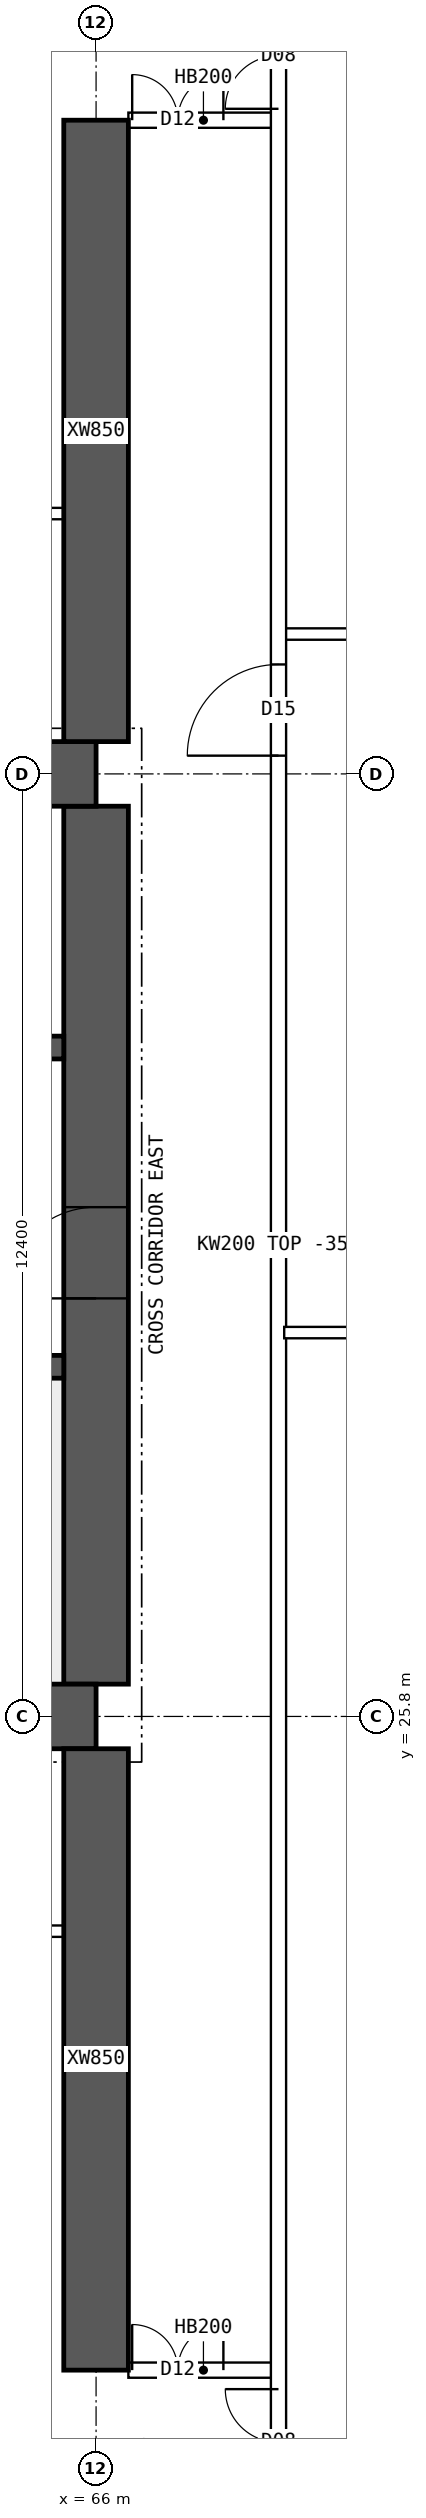
"""IFC4 building model, lengths in metres.
Left out: names, types, materials, properties, quantities, classifications, styles, units other than length and angle.
Written with IfcOpenShell. Run it as: python <this file> out.ifc"""

import sys

from ifc_helpers import new_model, si_unit, direction, frame, frame_2d, origin, place, context, subcontext, project, spatial, polyline, rectangle, outline, extrude, element, fill, save


model = new_model("IFC4")
c1 = context("Model", 3, precision=1e-05, world=origin(), true_north=direction((0.0, 1.0)))
c2 = subcontext(c1, "Body", "Model", "MODEL_VIEW")
j1 = project(units=[si_unit("LENGTHUNIT", "METRE"), si_unit("PLANEANGLEUNIT", "RADIAN")], contexts=[c1])
p1 = place(None, origin())
s1 = spatial("IfcSite", under=j1, at=p1, CompositionType="ELEMENT")
p2 = place(p1, origin())
s2 = spatial("IfcBuilding", under=s1, at=p2, CompositionType="ELEMENT")
p3 = place(p2, frame((0.0, 0.0, 197.35)))
s3 = spatial("IfcBuildingStorey", under=s2, at=p3, CompositionType="ELEMENT", Elevation=197.35)
for number, where, z_axis, x_axis in (
    (1, (18.0, 25.8, 0.0), (0.0, 0.0, 1.0), (1.0, 0.0, 0.0)),
    (2, (18.0, 38.2, 0.0), (0.0, 0.0, 1.0), (1.0, 0.0, 0.0)),
):
    element("IfcWall", number, at=place(p3, frame(where, z_axis=z_axis, x_axis=x_axis)), inside=s3, PredefinedType="SHEAR", context=c2, shape_type="SweptSolid", body=[
        extrude(rectangle(XDim=48.0, YDim=0.85, at=frame_2d((24.0, 0.0))), origin(), (0.0, 0.0, 1.0), 3.75),
    ])
p4 = place(p3, frame((66.0, 26.225, 0.0), z_axis=(0.0, 0.0, 1.0), x_axis=(0.0, 1.0, 0.0)))
e3 = element("IfcWall", 3, at=p4, inside=s3, PredefinedType="SHEAR", context=c2, shape_type="SweptSolid", body=[
    extrude(rectangle(XDim=11.55, YDim=0.85, at=frame_2d((5.775, 0.0))), origin(), (0.0, 0.0, 1.0), 3.75),
])
p5 = place(p4, frame((5.075, 0.0, 0.0)))
e4 = element("IfcOpeningElement", 4, at=p5, cuts=e3, PredefinedType="OPENING", context=c2, shape_type="SweptSolid", body=[
    extrude(rectangle(XDim=1.2, YDim=2.1, at=frame_2d((0.6, 1.05))), frame((0.0, 0.435, 0.0), z_axis=(0.0, -1.0, 0.0), x_axis=(1.0, 0.0, 0.0)), (0.0, 0.0, 1.0), 0.87),
])
p6 = place(p3, frame((18.425, 30.4, 0.0), z_axis=(0.0, 0.0, 1.0), x_axis=(1.0, 0.0, 0.0)))
e5 = element("IfcWall", 5, at=p6, inside=s3, PredefinedType="SHEAR", context=c2, shape_type="SweptSolid", body=[
    extrude(rectangle(XDim=47.15, YDim=0.3, at=frame_2d((23.575, 0.0))), origin(), (0.0, 0.0, 1.0), 3.75),
])
p7 = place(p6, frame((0.4, 0.0, 0.0)))
e6 = element("IfcOpeningElement", 6, at=p7, cuts=e5, PredefinedType="OPENING", context=c2, shape_type="SweptSolid", body=[
    extrude(rectangle(XDim=1.0, YDim=2.1, at=frame_2d((0.5, 1.05))), frame((0.0, 0.16, 0.0), z_axis=(0.0, -1.0, 0.0), x_axis=(1.0, 0.0, 0.0)), (0.0, 0.0, 1.0), 0.32),
])
p8 = place(p6, frame((45.75, 0.0, 0.0)))
e7 = element("IfcOpeningElement", 7, at=p8, cuts=e5, PredefinedType="OPENING", context=c2, shape_type="SweptSolid", body=[
    extrude(rectangle(XDim=1.0, YDim=2.1, at=frame_2d((0.5, 1.05))), frame((0.0, 0.16, 0.0), z_axis=(0.0, -1.0, 0.0), x_axis=(1.0, 0.0, 0.0)), (0.0, 0.0, 1.0), 0.32),
])
p9 = place(p6, frame((8.325, 0.0, 0.0)))
e8 = element("IfcOpeningElement", 8, at=p9, cuts=e5, PredefinedType="OPENING", context=c2, shape_type="SweptSolid", body=[
    extrude(rectangle(XDim=1.1, YDim=2.1, at=frame_2d((0.55, 1.05))), frame((0.0, 0.16, 0.0), z_axis=(0.0, -1.0, 0.0), x_axis=(1.0, 0.0, 0.0)), (0.0, 0.0, 1.0), 0.32),
])
p10 = place(p6, frame((10.925, 0.0, 0.0)))
e9 = element("IfcOpeningElement", 9, at=p10, cuts=e5, PredefinedType="OPENING", context=c2, shape_type="SweptSolid", body=[
    extrude(rectangle(XDim=1.1, YDim=2.1, at=frame_2d((0.55, 1.05))), frame((0.0, 0.16, 0.0), z_axis=(0.0, -1.0, 0.0), x_axis=(1.0, 0.0, 0.0)), (0.0, 0.0, 1.0), 0.32),
])
p11 = place(p6, frame((13.525, 0.0, 0.0)))
e10 = element("IfcOpeningElement", 10, at=p11, cuts=e5, PredefinedType="OPENING", context=c2, shape_type="SweptSolid", body=[
    extrude(rectangle(XDim=1.1, YDim=2.1, at=frame_2d((0.55, 1.05))), frame((0.0, 0.16, 0.0), z_axis=(0.0, -1.0, 0.0), x_axis=(1.0, 0.0, 0.0)), (0.0, 0.0, 1.0), 0.32),
])
p12 = place(p6, frame((16.125, 0.0, 0.0)))
e11 = element("IfcOpeningElement", 11, at=p12, cuts=e5, PredefinedType="OPENING", context=c2, shape_type="SweptSolid", body=[
    extrude(rectangle(XDim=1.1, YDim=2.1, at=frame_2d((0.55, 1.05))), frame((0.0, 0.16, 0.0), z_axis=(0.0, -1.0, 0.0), x_axis=(1.0, 0.0, 0.0)), (0.0, 0.0, 1.0), 0.32),
])
p13 = place(p6, frame((18.9, 0.0, 0.0)))
e12 = element("IfcOpeningElement", 12, at=p13, cuts=e5, PredefinedType="OPENING", context=c2, shape_type="SweptSolid", body=[
    extrude(rectangle(XDim=0.9, YDim=2.1, at=frame_2d((0.45, 1.05))), frame((0.0, 0.16, 0.0), z_axis=(0.0, -1.0, 0.0), x_axis=(1.0, 0.0, 0.0)), (0.0, 0.0, 1.0), 0.32),
])
p14 = place(p6, frame((30.192, 0.0, 0.0)))
e13 = element("IfcOpeningElement", 13, at=p14, cuts=e5, PredefinedType="OPENING", context=c2, shape_type="SweptSolid", body=[
    extrude(rectangle(XDim=1.1, YDim=2.1, at=frame_2d((0.55, 1.05))), frame((0.0, 0.16, 0.0), z_axis=(0.0, -1.0, 0.0), x_axis=(1.0, 0.0, 0.0)), (0.0, 0.0, 1.0), 0.32),
])
p15 = place(p6, frame((33.725, 0.0, 0.0)))
e14 = element("IfcOpeningElement", 14, at=p15, cuts=e5, PredefinedType="OPENING", context=c2, shape_type="SweptSolid", body=[
    extrude(rectangle(XDim=1.1, YDim=2.1, at=frame_2d((0.55, 1.05))), frame((0.0, 0.16, 0.0), z_axis=(0.0, -1.0, 0.0), x_axis=(1.0, 0.0, 0.0)), (0.0, 0.0, 1.0), 0.32),
])
p16 = place(p6, frame((37.258, 0.0, 0.0)))
e15 = element("IfcOpeningElement", 15, at=p16, cuts=e5, PredefinedType="OPENING", context=c2, shape_type="SweptSolid", body=[
    extrude(rectangle(XDim=1.1, YDim=2.1, at=frame_2d((0.55, 1.05))), frame((0.0, 0.16, 0.0), z_axis=(0.0, -1.0, 0.0), x_axis=(1.0, 0.0, 0.0)), (0.0, 0.0, 1.0), 0.32),
])
p17 = place(p3, frame((18.425, 34.6, 0.0), z_axis=(0.0, 0.0, 1.0), x_axis=(1.0, 0.0, 0.0)))
e16 = element("IfcWall", 16, at=p17, inside=s3, PredefinedType="SHEAR", context=c2, shape_type="SweptSolid", body=[
    extrude(rectangle(XDim=47.15, YDim=0.3, at=frame_2d((23.575, 0.0))), origin(), (0.0, 0.0, 1.0), 3.75),
])
p18 = place(p17, frame((0.9, 0.0, 0.0)))
e17 = element("IfcOpeningElement", 17, at=p18, cuts=e16, PredefinedType="OPENING", context=c2, shape_type="SweptSolid", body=[
    extrude(rectangle(XDim=1.1, YDim=2.1, at=frame_2d((0.55, 1.05))), frame((0.0, 0.16, 0.0), z_axis=(0.0, -1.0, 0.0), x_axis=(1.0, 0.0, 0.0)), (0.0, 0.0, 1.0), 0.32),
])
p19 = place(p17, frame((45.15, 0.0, 0.0)))
e18 = element("IfcOpeningElement", 18, at=p19, cuts=e16, PredefinedType="OPENING", context=c2, shape_type="SweptSolid", body=[
    extrude(rectangle(XDim=1.1, YDim=2.1, at=frame_2d((0.55, 1.05))), frame((0.0, 0.16, 0.0), z_axis=(0.0, -1.0, 0.0), x_axis=(1.0, 0.0, 0.0)), (0.0, 0.0, 1.0), 0.32),
])
p20 = place(p17, frame((4.175, 0.0, 0.0)))
e19 = element("IfcOpeningElement", 19, at=p20, cuts=e16, PredefinedType="OPENING", context=c2, shape_type="SweptSolid", body=[
    extrude(rectangle(XDim=0.9, YDim=2.1, at=frame_2d((0.45, 1.05))), frame((0.0, 0.16, 0.0), z_axis=(0.0, -1.0, 0.0), x_axis=(1.0, 0.0, 0.0)), (0.0, 0.0, 1.0), 0.32),
])
p21 = place(p17, frame((42.075, 0.0, 0.0)))
e20 = element("IfcOpeningElement", 20, at=p21, cuts=e16, PredefinedType="OPENING", context=c2, shape_type="SweptSolid", body=[
    extrude(rectangle(XDim=0.9, YDim=2.1, at=frame_2d((0.45, 1.05))), frame((0.0, 0.16, 0.0), z_axis=(0.0, -1.0, 0.0), x_axis=(1.0, 0.0, 0.0)), (0.0, 0.0, 1.0), 0.32),
])
p22 = place(p17, frame((8.95, 0.0, 0.0)))
e21 = element("IfcOpeningElement", 21, at=p22, cuts=e16, PredefinedType="OPENING", context=c2, shape_type="SweptSolid", body=[
    extrude(rectangle(XDim=0.9, YDim=2.1, at=frame_2d((0.45, 1.05))), frame((0.0, 0.16, 0.0), z_axis=(0.0, -1.0, 0.0), x_axis=(1.0, 0.0, 0.0)), (0.0, 0.0, 1.0), 0.32),
])
p23 = place(p17, frame((12.924, 0.0, 0.0)))
e22 = element("IfcOpeningElement", 22, at=p23, cuts=e16, PredefinedType="OPENING", context=c2, shape_type="SweptSolid", body=[
    extrude(rectangle(XDim=0.9, YDim=2.1, at=frame_2d((0.45, 1.05))), frame((0.0, 0.16, 0.0), z_axis=(0.0, -1.0, 0.0), x_axis=(1.0, 0.0, 0.0)), (0.0, 0.0, 1.0), 0.32),
])
p24 = place(p17, frame((16.571, 0.0, 0.0)))
e23 = element("IfcOpeningElement", 23, at=p24, cuts=e16, PredefinedType="OPENING", context=c2, shape_type="SweptSolid", body=[
    extrude(rectangle(XDim=0.9, YDim=2.1, at=frame_2d((0.45, 1.05))), frame((0.0, 0.16, 0.0), z_axis=(0.0, -1.0, 0.0), x_axis=(1.0, 0.0, 0.0)), (0.0, 0.0, 1.0), 0.32),
])
p25 = place(p17, frame((20.33, 0.0, 0.0)))
e24 = element("IfcOpeningElement", 24, at=p25, cuts=e16, PredefinedType="OPENING", context=c2, shape_type="SweptSolid", body=[
    extrude(rectangle(XDim=0.9, YDim=2.1, at=frame_2d((0.45, 1.05))), frame((0.0, 0.16, 0.0), z_axis=(0.0, -1.0, 0.0), x_axis=(1.0, 0.0, 0.0)), (0.0, 0.0, 1.0), 0.32),
])
p26 = place(p17, frame((24.736, 0.0, 0.0)))
e25 = element("IfcOpeningElement", 25, at=p26, cuts=e16, PredefinedType="OPENING", context=c2, shape_type="SweptSolid", body=[
    extrude(rectangle(XDim=0.9, YDim=2.1, at=frame_2d((0.45, 1.05))), frame((0.0, 0.16, 0.0), z_axis=(0.0, -1.0, 0.0), x_axis=(1.0, 0.0, 0.0)), (0.0, 0.0, 1.0), 0.32),
])
p27 = place(p17, frame((27.533, 0.0, 0.0)))
e26 = element("IfcOpeningElement", 26, at=p27, cuts=e16, PredefinedType="OPENING", context=c2, shape_type="SweptSolid", body=[
    extrude(rectangle(XDim=0.9, YDim=2.1, at=frame_2d((0.45, 1.05))), frame((0.0, 0.16, 0.0), z_axis=(0.0, -1.0, 0.0), x_axis=(1.0, 0.0, 0.0)), (0.0, 0.0, 1.0), 0.32),
])
p28 = place(p17, frame((29.703, 0.0, 0.0)))
e27 = element("IfcOpeningElement", 27, at=p28, cuts=e16, PredefinedType="OPENING", context=c2, shape_type="SweptSolid", body=[
    extrude(rectangle(XDim=0.9, YDim=2.1, at=frame_2d((0.45, 1.05))), frame((0.0, 0.16, 0.0), z_axis=(0.0, -1.0, 0.0), x_axis=(1.0, 0.0, 0.0)), (0.0, 0.0, 1.0), 0.32),
])
p29 = place(p17, frame((33.502, 0.0, 0.0)))
e28 = element("IfcOpeningElement", 28, at=p29, cuts=e16, PredefinedType="OPENING", context=c2, shape_type="SweptSolid", body=[
    extrude(rectangle(XDim=0.9, YDim=2.1, at=frame_2d((0.45, 1.05))), frame((0.0, 0.16, 0.0), z_axis=(0.0, -1.0, 0.0), x_axis=(1.0, 0.0, 0.0)), (0.0, 0.0, 1.0), 0.32),
])
p30 = place(p17, frame((37.453, 0.0, 0.0)))
e29 = element("IfcOpeningElement", 29, at=p30, cuts=e16, PredefinedType="OPENING", context=c2, shape_type="SweptSolid", body=[
    extrude(rectangle(XDim=0.9, YDim=2.1, at=frame_2d((0.45, 1.05))), frame((0.0, 0.16, 0.0), z_axis=(0.0, -1.0, 0.0), x_axis=(1.0, 0.0, 0.0)), (0.0, 0.0, 1.0), 0.32),
])
for number, where, z_axis, x_axis in (
    (30, (66.0, 17.2, 0.0), (0.0, 0.0, 1.0), (0.0, 1.0, 0.0)),
    (31, (66.0, 38.625, 0.0), (0.0, 0.0, 1.0), (0.0, 1.0, 0.0)),
):
    element("IfcWall", number, at=place(p3, frame(where, z_axis=z_axis, x_axis=x_axis)), inside=s3, PredefinedType="SHEAR", context=c2, shape_type="SweptSolid", body=[
        extrude(rectangle(XDim=8.175, YDim=0.85, at=frame_2d((4.087, 0.0))), origin(), (0.0, 0.0, 1.0), 3.75),
    ])
p31 = place(p3, frame((66.425, 17.2, 0.0), z_axis=(0.0, 0.0, 1.0), x_axis=(1.0, 0.0, 0.0)))
e32 = element("IfcWall", 32, at=p31, inside=s3, PredefinedType="SOLIDWALL", context=c2, shape_type="SweptSolid", body=[
    extrude(rectangle(XDim=1.975, YDim=0.2, at=frame_2d((0.987, 0.0))), origin(), (0.0, 0.0, 1.0), 3.4),
])
p32 = place(p31, frame((0.05, 0.0, 0.0)))
e33 = element("IfcOpeningElement", 33, at=p32, cuts=e32, PredefinedType="OPENING", context=c2, shape_type="SweptSolid", body=[
    extrude(rectangle(XDim=1.2, YDim=2.1, at=frame_2d((0.6, 1.05))), frame((0.0, 0.11, 0.0), z_axis=(0.0, -1.0, 0.0), x_axis=(1.0, 0.0, 0.0)), (0.0, 0.0, 1.0), 0.22),
])
p33 = place(p3, frame((66.425, 46.8, 0.0), z_axis=(0.0, 0.0, 1.0), x_axis=(1.0, 0.0, 0.0)))
e34 = element("IfcWall", 34, at=p33, inside=s3, PredefinedType="SOLIDWALL", context=c2, shape_type="SweptSolid", body=[
    extrude(rectangle(XDim=1.975, YDim=0.2, at=frame_2d((0.987, 0.0))), origin(), (0.0, 0.0, 1.0), 3.4),
])
p34 = place(p33, frame((0.05, 0.0, 0.0)))
e35 = element("IfcOpeningElement", 35, at=p34, cuts=e34, PredefinedType="OPENING", context=c2, shape_type="SweptSolid", body=[
    extrude(rectangle(XDim=1.2, YDim=2.1, at=frame_2d((0.6, 1.05))), frame((0.0, 0.11, 0.0), z_axis=(0.0, -1.0, 0.0), x_axis=(1.0, 0.0, 0.0)), (0.0, 0.0, 1.0), 0.22),
])
p35 = place(p3, frame((60.075, 22.975, 0.0), z_axis=(0.0, 0.0, 1.0), x_axis=(1.0, 0.0, 0.0)))
e36 = element("IfcWall", 36, at=p35, inside=s3, PredefinedType="PARTITIONING", context=c2, shape_type="SweptSolid", body=[
    extrude(rectangle(XDim=5.5, YDim=0.15, at=frame_2d((2.75, 0.0))), origin(), (0.0, 0.0, 1.0), 3.4),
])
p36 = place(p35, frame((0.4, 0.0, 0.0)))
e37 = element("IfcOpeningElement", 37, at=p36, cuts=e36, PredefinedType="OPENING", context=c2, shape_type="SweptSolid", body=[
    extrude(rectangle(XDim=1.0, YDim=2.1, at=frame_2d((0.5, 1.05))), frame((0.0, 0.085, 0.0), z_axis=(0.0, -1.0, 0.0), x_axis=(1.0, 0.0, 0.0)), (0.0, 0.0, 1.0), 0.17),
])
p37 = place(p3, frame((65.575, 41.625, 0.0), z_axis=(0.0, 0.0, 1.0), x_axis=(-1.0, 0.0, 0.0)))
e38 = element("IfcWall", 38, at=p37, inside=s3, PredefinedType="PARTITIONING", context=c2, shape_type="SweptSolid", body=[
    extrude(rectangle(XDim=5.5, YDim=0.15, at=frame_2d((2.75, 0.0))), origin(), (0.0, 0.0, 1.0), 3.4),
])
p38 = place(p37, frame((0.4, 0.0, 0.0)))
e39 = element("IfcOpeningElement", 39, at=p38, cuts=e38, PredefinedType="OPENING", context=c2, shape_type="SweptSolid", body=[
    extrude(rectangle(XDim=1.0, YDim=2.1, at=frame_2d((0.5, 1.05))), frame((0.0, 0.085, 0.0), z_axis=(0.0, -1.0, 0.0), x_axis=(1.0, 0.0, 0.0)), (0.0, 0.0, 1.0), 0.17),
])
p39 = place(p3, frame((68.475, 30.85, 0.0), z_axis=(0.0, 0.0, 1.0), x_axis=(1.0, 0.0, 0.0)))
e40 = element("IfcWall", 40, at=p39, inside=s3, PredefinedType="PARTITIONING", context=c2, shape_type="SweptSolid", body=[
    extrude(outline(polyline([(0.0, 0.0), (6.82, 0.0), (6.82, 3.4), (3.827, 3.4), (3.825, 2.95), (3.227, 2.95), (3.225, 3.4), (0.0, 3.4), (0.0, 0.0)])), frame((0.0, 0.075, 0.0), z_axis=(0.0, -1.0, 0.0), x_axis=(1.0, 0.0, 0.0)), (0.0, 0.0, 1.0), 0.15),
])
p40 = place(p3, frame((68.4, 10.446, 0.0), z_axis=(0.0, 0.0, 1.0), x_axis=(0.0, 1.0, 0.0)))
e41 = element("IfcWall", 41, at=p40, inside=s3, PredefinedType="SOLIDWALL", context=c2, shape_type="SweptSolid", body=[
    extrude(rectangle(XDim=43.107, YDim=0.2, at=frame_2d((21.554, 0.0))), origin(), (0.0, 0.0, 1.0), 3.4),
])
p41 = place(p40, frame((27.994, 0.0, 0.0)))
e42 = element("IfcOpeningElement", 42, at=p41, cuts=e41, PredefinedType="OPENING", context=c2, shape_type="SweptSolid", body=[
    extrude(rectangle(XDim=1.2, YDim=2.1, at=frame_2d((0.6, 1.05))), frame((0.0, 0.11, 0.0), z_axis=(0.0, -1.0, 0.0), x_axis=(1.0, 0.0, 0.0)), (0.0, 0.0, 1.0), 0.22),
])
p42 = place(p40, frame((5.104, 0.0, 0.0)))
e43 = element("IfcOpeningElement", 43, at=p42, cuts=e41, PredefinedType="OPENING", context=c2, shape_type="SweptSolid", body=[
    extrude(rectangle(XDim=1.4, YDim=2.1, at=frame_2d((0.7, 1.05))), frame((0.0, 0.11, 0.0), z_axis=(0.0, -1.0, 0.0), x_axis=(1.0, 0.0, 0.0)), (0.0, 0.0, 1.0), 0.22),
])
p43 = place(p40, frame((36.504, 0.0, 0.0)))
e44 = element("IfcOpeningElement", 44, at=p43, cuts=e41, PredefinedType="OPENING", context=c2, shape_type="SweptSolid", body=[
    extrude(rectangle(XDim=1.4, YDim=2.1, at=frame_2d((0.7, 1.05))), frame((0.0, 0.11, 0.0), z_axis=(0.0, -1.0, 0.0), x_axis=(1.0, 0.0, 0.0)), (0.0, 0.0, 1.0), 0.22),
])
p44 = place(p3, frame((68.475, 40.04, 0.0), z_axis=(0.0, 0.0, 1.0), x_axis=(1.0, 0.0, 0.0)))
e45 = element("IfcWall", 45, at=p44, inside=s3, PredefinedType="PARTITIONING", context=c2, shape_type="SweptSolid", body=[
    extrude(rectangle(XDim=6.82, YDim=0.15, at=frame_2d((3.41, 0.0))), origin(), (0.0, 0.0, 1.0), 3.4),
])
p45 = place(p5, origin())
e46 = element("IfcDoor", 46, at=p45, inside=s3, OperationType="SINGLE_SWING_LEFT", PredefinedType="DOOR", context=c2, shape_type="SweptSolid", body=[
    extrude(rectangle(XDim=1.2, YDim=2.1, at=frame_2d((0.6, 1.05))), frame((0.0, 0.025, 0.0), z_axis=(0.0, -1.0, 0.0), x_axis=(1.0, 0.0, 0.0)), (0.0, 0.0, 1.0), 0.05),
])
fill(e4, e46)
p46 = place(p32, origin())
e47 = element("IfcDoor", 47, at=p46, inside=s3, OperationType="DOUBLE_DOOR_SINGLE_SWING", PredefinedType="DOOR", context=c2, shape_type="SweptSolid", body=[
    extrude(rectangle(XDim=1.2, YDim=2.1, at=frame_2d((0.6, 1.05))), frame((0.0, 0.025, 0.0), z_axis=(0.0, -1.0, 0.0), x_axis=(1.0, 0.0, 0.0)), (0.0, 0.0, 1.0), 0.05),
])
fill(e33, e47)
p47 = place(p34, origin())
e48 = element("IfcDoor", 48, at=p47, inside=s3, OperationType="DOUBLE_DOOR_SINGLE_SWING", PredefinedType="DOOR", context=c2, shape_type="SweptSolid", body=[
    extrude(rectangle(XDim=1.2, YDim=2.1, at=frame_2d((0.6, 1.05))), frame((0.0, 0.025, 0.0), z_axis=(0.0, -1.0, 0.0), x_axis=(1.0, 0.0, 0.0)), (0.0, 0.0, 1.0), 0.05),
])
fill(e35, e48)
p48 = place(p41, origin())
e49 = element("IfcDoor", 49, at=p48, inside=s3, OperationType="SINGLE_SWING_LEFT", PredefinedType="DOOR", context=c2, shape_type="SweptSolid", body=[
    extrude(rectangle(XDim=1.2, YDim=2.1, at=frame_2d((0.6, 1.05))), frame((0.0, 0.025, 0.0), z_axis=(0.0, -1.0, 0.0), x_axis=(1.0, 0.0, 0.0)), (0.0, 0.0, 1.0), 0.05),
])
fill(e42, e49)
p49 = place(p42, origin())
e50 = element("IfcDoor", 50, at=p49, inside=s3, OperationType="DOUBLE_DOOR_SINGLE_SWING", PredefinedType="DOOR", context=c2, shape_type="SweptSolid", body=[
    extrude(rectangle(XDim=1.4, YDim=2.1, at=frame_2d((0.7, 1.05))), frame((0.0, 0.025, 0.0), z_axis=(0.0, -1.0, 0.0), x_axis=(1.0, 0.0, 0.0)), (0.0, 0.0, 1.0), 0.05),
])
fill(e43, e50)
p50 = place(p43, origin())
e51 = element("IfcDoor", 51, at=p50, inside=s3, OperationType="DOUBLE_DOOR_SINGLE_SWING", PredefinedType="DOOR", context=c2, shape_type="SweptSolid", body=[
    extrude(rectangle(XDim=1.4, YDim=2.1, at=frame_2d((0.7, 1.05))), frame((0.0, 0.025, 0.0), z_axis=(0.0, -1.0, 0.0), x_axis=(1.0, 0.0, 0.0)), (0.0, 0.0, 1.0), 0.05),
])
fill(e44, e51)
save(model, sys.argv[1])
